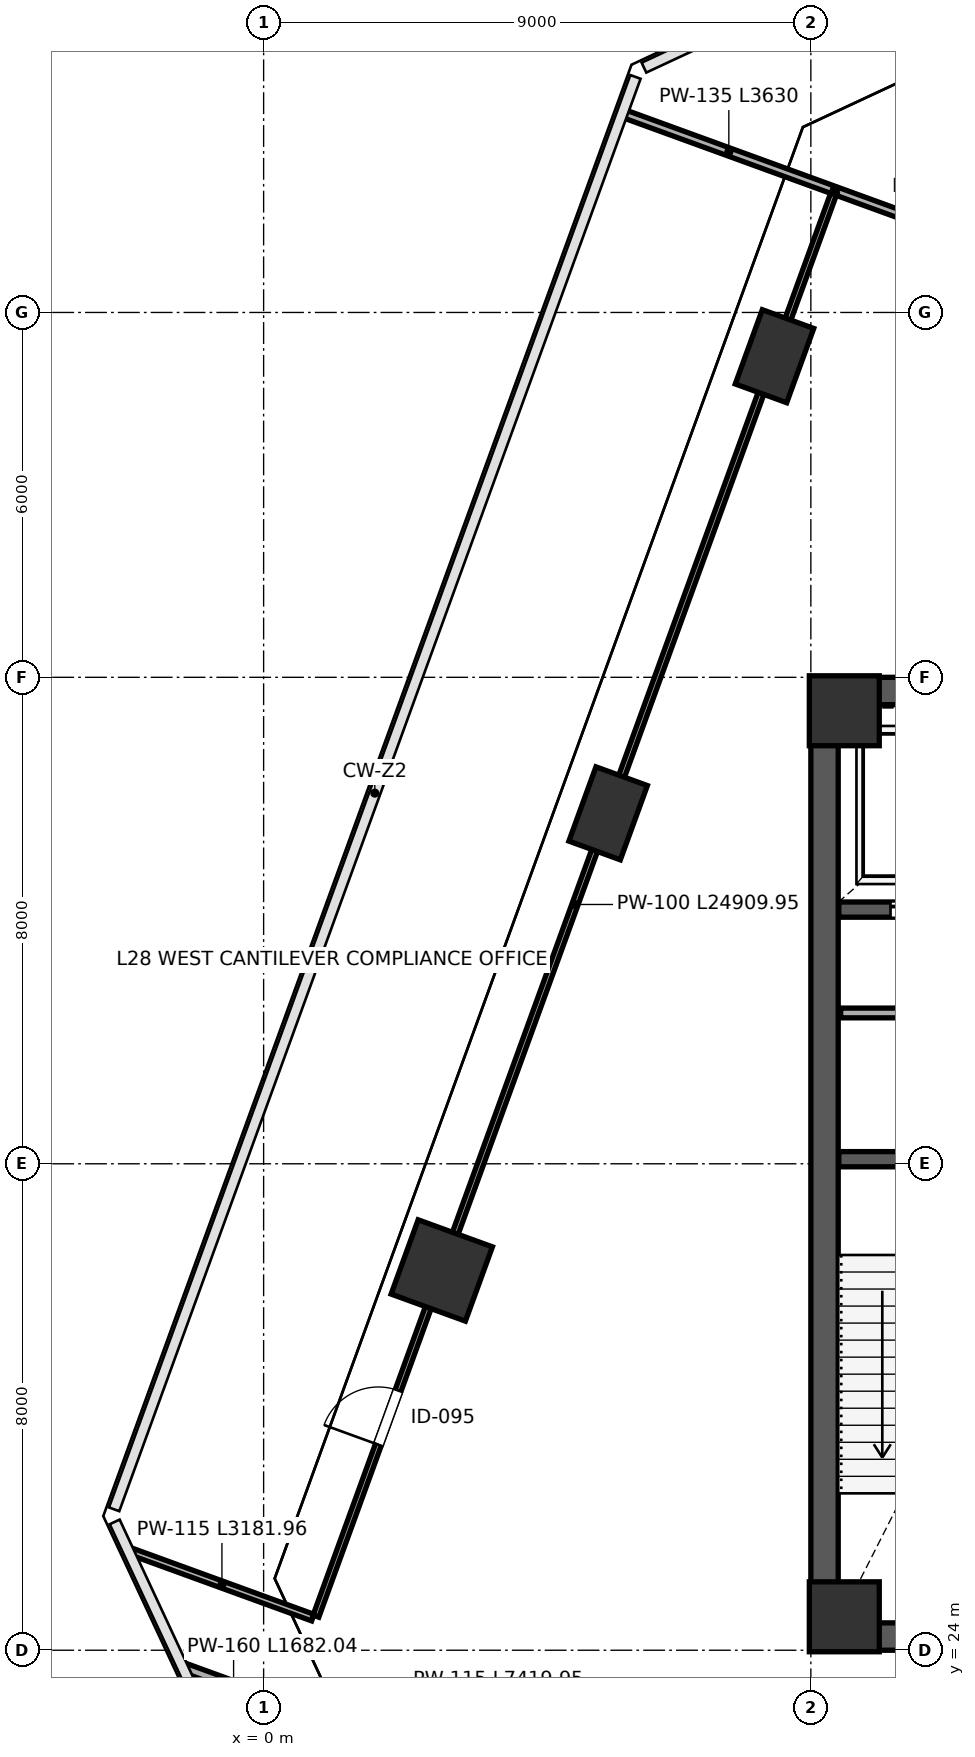
"""IFC4 building model, lengths in metres.
Left out: names, types, materials, properties, quantities, classifications, styles, units other than length and angle.
Written with IfcOpenShell. Run it as: python <this file> out.ifc"""

import sys

from ifc_helpers import new_model, si_unit, direction, frame, frame_2d, origin, origin_2d, place, context, subcontext, project, spatial, rectangle, extrude, source, transform, mapped, element, fill, save


model = new_model("IFC4")
c1 = context("Model", 3, precision=1e-05, world=origin(), true_north=direction((0.0, 1.0)))
c2 = subcontext(c1, "Body", "Model", "MODEL_VIEW")
j1 = project(units=[si_unit("LENGTHUNIT", "METRE"), si_unit("PLANEANGLEUNIT", "RADIAN")], contexts=[c1])
p1 = place(None, origin())
s1 = spatial("IfcSite", under=j1, at=p1, CompositionType="ELEMENT")
p2 = place(p1, origin())
s2 = spatial("IfcBuilding", under=s1, at=p2, CompositionType="ELEMENT")
p3 = place(p2, frame((0.0, 0.0, 127.6)))
s3 = spatial("IfcBuildingStorey", under=s2, at=p3, CompositionType="ELEMENT", Elevation=127.6)
m1 = source(origin(), c2, "Body", "SweptSolid", [
    extrude(rectangle(XDim=1.15, YDim=1.15, at=origin_2d()), origin(), (0.0, 0.0, 1.0), 5.398),
])
for number, where, z_axis, x_axis in (
    (1, (9.55, 24.55, 0.001), (0.0, 0.0, 1.0), (1.0, 0.0, 0.0)),
    (2, (9.55, 39.45, 0.001), (0.0, 0.0, 1.0), (1.0, 0.0, 0.0)),
):
    element("IfcColumn", number, at=place(p3, frame(where, z_axis=z_axis, x_axis=x_axis)), inside=s3, PredefinedType="COLUMN", context=c2, shape_type="MappedRepresentation", body=[
        mapped(m1, transform((0.0, 0.0, 0.0), scale=1.0)),
    ])
m2 = source(origin(), c2, "Body", "SweptSolid", [
    extrude(rectangle(XDim=1.3, YDim=1.3, at=origin_2d()), origin(), (0.0, 0.0, 1.0), 5.398),
])
p4 = place(p3, frame((2.93, 30.246, 0.001), z_axis=(0.0, 0.0, 1.0), x_axis=(-0.939692620786, 0.342020143326, 0.0)))
e3 = element("IfcColumn", 3, at=p4, inside=s3, PredefinedType="COLUMN", context=c2, shape_type="MappedRepresentation", body=[
    mapped(m2, transform((0.0, 0.0, 0.0), scale=1.0)),
])
m3 = source(origin(), c2, "Body", "SweptSolid", [
    extrude(rectangle(XDim=0.9, YDim=1.3, at=origin_2d()), origin(), (0.0, 0.0, 1.0), 5.398),
])
for number, where, z_axis, x_axis in (
    (4, (5.666, 37.763, 0.001), (0.0, 0.0, 1.0), (-0.94, 0.342, 0.0)),
    (5, (8.402, 45.281, 0.001), (0.0, 0.0, 1.0), (-0.94, 0.342, 0.0)),
):
    element("IfcColumn", number, at=place(p3, frame(where, z_axis=z_axis, x_axis=x_axis)), inside=s3, PredefinedType="PILASTER", context=c2, shape_type="MappedRepresentation", body=[
        mapped(m3, transform((0.0, 0.0, 0.0), scale=1.0)),
    ])
p5 = place(p3, frame((9.225, 24.45, 0.0), z_axis=(0.0, 0.0, 1.0), x_axis=(0.0, 1.0, 0.0)))
e6 = element("IfcWall", 6, at=p5, inside=s3, PredefinedType="SHEAR", context=c2, shape_type="SweptSolid", body=[
    extrude(rectangle(XDim=15.1, YDim=0.45, at=frame_2d((7.55, 0.0))), origin(), (0.0, 0.0, 1.0), 5.16),
])
for number, where, z_axis, x_axis in (
    (7, (9.0, 24.225, 0.0), (0.0, 0.0, 1.0), (1.0, 0.0, 0.0)),
    (8, (9.0, 39.775, 0.0), (0.0, 0.0, 1.0), (1.0, 0.0, 0.0)),
):
    element("IfcWall", number, at=place(p3, frame(where, z_axis=z_axis, x_axis=x_axis)), inside=s3, PredefinedType="SHEAR", context=c2, shape_type="SweptSolid", body=[
        extrude(rectangle(XDim=18.0, YDim=0.45, at=frame_2d((9.0, 0.0))), origin(), (0.0, 0.0, 1.0), 5.16),
    ])
p6 = place(p3, frame((9.46, 32.075, 0.0), z_axis=(0.0, 0.0, 1.0), x_axis=(1.0, 0.0, 0.0)))
e9 = element("IfcWall", 9, at=p6, inside=s3, PredefinedType="SHEAR", context=c2, shape_type="SweptSolid", body=[
    extrude(rectangle(XDim=3.29, YDim=0.25, at=frame_2d((1.645, 0.0))), origin(), (0.0, 0.0, 1.0), 5.16),
])
p7 = place(p3, frame((9.46, 36.18, 0.0), z_axis=(0.0, 0.0, 1.0), x_axis=(1.0, 0.0, 0.0)))
e10 = element("IfcWall", 10, at=p7, inside=s3, PredefinedType="SHEAR", context=c2, shape_type="SweptSolid", body=[
    extrude(rectangle(XDim=3.79, YDim=0.25, at=frame_2d((1.895, 0.0))), origin(), (0.0, 0.0, 1.0), 5.16),
])
p8 = place(p7, frame((2.62, 0.0, 0.0)))
e11 = element("IfcOpeningElement", 11, at=p8, cuts=e10, PredefinedType="OPENING", context=c2, shape_type="SweptSolid", body=[
    extrude(rectangle(XDim=0.85, YDim=2.1, at=frame_2d((0.425, 1.05))), frame((0.0, 0.135, 0.0), z_axis=(0.0, -1.0, 0.0), x_axis=(1.0, 0.0, 0.0)), (0.0, 0.0, 1.0), 0.27),
])
p9 = place(p7, frame((0.85, 0.0, 0.0)))
e12 = element("IfcOpeningElement", 12, at=p9, cuts=e10, PredefinedType="OPENING", context=c2, shape_type="SweptSolid", body=[
    extrude(rectangle(XDim=1.3, YDim=2.25, at=frame_2d((0.65, 1.125))), frame((0.0, 0.135, 0.0), z_axis=(0.0, -1.0, 0.0), x_axis=(1.0, 0.0, 0.0)), (0.0, 0.0, 1.0), 0.27),
])
p10 = place(p3, frame((9.49, 34.48, 0.0), z_axis=(0.0, 0.0, 1.0), x_axis=(1.0, 0.0, 0.0)))
e13 = element("IfcWall", 13, at=p10, inside=s3, PredefinedType="PARTITIONING", context=c2, shape_type="SweptSolid", body=[
    extrude(rectangle(XDim=3.7, YDim=0.16, at=frame_2d((1.85, 0.0))), origin(), (0.0, 0.0, 1.0), 5.16),
])
p11 = place(p10, frame((1.15, 0.0, 0.0)))
e14 = element("IfcOpeningElement", 14, at=p11, cuts=e13, PredefinedType="OPENING", context=c2, shape_type="SweptSolid", body=[
    extrude(rectangle(XDim=0.9, YDim=2.15, at=frame_2d((0.45, 1.075))), frame((0.0, 0.09, 0.0), z_axis=(0.0, -1.0, 0.0), x_axis=(1.0, 0.0, 0.0)), (0.0, 0.0, 1.0), 0.18),
])
p12 = place(p3, frame((-1.284, 23.702, 0.0), z_axis=(0.0, 0.0, 1.0), x_axis=(0.939708634779, -0.341976142036, 0.0)))
e15 = element("IfcWall", 15, at=p12, inside=s3, PredefinedType="PARTITIONING", context=c2, shape_type="SweptSolid", body=[
    extrude(rectangle(XDim=1.682, YDim=0.16, at=frame_2d((0.841, 0.0))), origin(), (0.0, 0.0, 1.0), 5.16),
])
p13 = place(p3, frame((9.432, 47.992, 0.0), z_axis=(0.0, 0.0, 1.0), x_axis=(0.939693422468, -0.342017940715, 0.0)))
e16 = element("IfcWall", 16, at=p13, inside=s3, PredefinedType="PARTITIONING", context=c2, shape_type="SweptSolid", body=[
    extrude(rectangle(XDim=26.67, YDim=0.135, at=frame_2d((13.335, 0.0))), origin(), (0.0, 0.0, 1.0), 5.16),
])
p14 = place(p13, frame((1.05, 0.0, 0.0)))
e17 = element("IfcOpeningElement", 17, at=p14, cuts=e16, PredefinedType="OPENING", context=c2, shape_type="SweptSolid", body=[
    extrude(rectangle(XDim=0.95, YDim=2.15, at=frame_2d((0.475, 1.075))), frame((0.0, 0.078, 0.0), z_axis=(0.0, -1.0, 0.0), x_axis=(1.0, 0.0, 0.0)), (0.0, 0.0, 1.0), 0.155),
])
p15 = place(p3, frame((-2.181, 25.625, 0.0), z_axis=(0.0, 0.0, 1.0), x_axis=(0.939714994714, -0.341958665206, 0.0)))
e18 = element("IfcWall", 18, at=p15, inside=s3, PredefinedType="PARTITIONING", context=c2, shape_type="SweptSolid", body=[
    extrude(rectangle(XDim=3.182, YDim=0.115, at=frame_2d((1.591, 0.0))), origin(), (0.0, 0.0, 1.0), 5.16),
])
p16 = place(p3, frame((0.861, 24.56, 0.0), z_axis=(0.0, 0.0, 1.0), x_axis=(0.342022409736, 0.939691795877, 0.0)))
e19 = element("IfcWall", 19, at=p16, inside=s3, PredefinedType="PARTITIONING", context=c2, shape_type="SweptSolid", body=[
    extrude(rectangle(XDim=24.91, YDim=0.1, at=frame_2d((12.455, 0.0))), origin(), (0.0, 0.0, 1.0), 4.395),
])
p17 = place(p16, frame((3.0, 0.0, 0.0)))
e20 = element("IfcOpeningElement", 20, at=p17, cuts=e19, PredefinedType="OPENING", context=c2, shape_type="SweptSolid", body=[
    extrude(rectangle(XDim=0.95, YDim=2.15, at=frame_2d((0.475, 1.075))), frame((0.0, 0.06, 0.0), z_axis=(0.0, -1.0, 0.0), x_axis=(1.0, 0.0, 0.0)), (0.0, 0.0, 1.0), 0.12),
])
p18 = place(p3, frame((5.946, 49.261, 0.0), z_axis=(0.0, 0.0, 1.0), x_axis=(0.939679480515, -0.342056243766, 0.0)))
e21 = element("IfcWall", 21, at=p18, inside=s3, PredefinedType="PARTITIONING", context=c2, shape_type="SweptSolid", body=[
    extrude(rectangle(XDim=3.63, YDim=0.135, at=frame_2d((1.815, 0.0))), origin(), (0.0, 0.0, 1.0), 5.16),
])
m4 = source(origin(), c2, "Body", "SweptSolid", [
    extrude(rectangle(XDim=1.3, YDim=2.25, at=frame_2d((0.65, 1.125))), frame((0.0, 0.025, 0.0), z_axis=(0.0, -1.0, 0.0), x_axis=(1.0, 0.0, 0.0)), (0.0, 0.0, 1.0), 0.05),
])
p19 = place(p9, origin())
e22 = element("IfcDoor", 22, at=p19, inside=s3, OperationType="SLIDING_TO_LEFT", PredefinedType="DOOR", context=c2, shape_type="MappedRepresentation", body=[
    mapped(m4, transform((0.0, 0.0, 0.0), scale=1.0)),
])
fill(e12, e22)
m5 = source(origin(), c2, "Body", "SweptSolid", [
    extrude(rectangle(XDim=0.95, YDim=2.15, at=frame_2d((0.475, 1.075))), frame((0.0, 0.025, 0.0), z_axis=(0.0, -1.0, 0.0), x_axis=(1.0, 0.0, 0.0)), (0.0, 0.0, 1.0), 0.05),
])
p20 = place(p17, origin())
e23 = element("IfcDoor", 23, at=p20, inside=s3, OperationType="SINGLE_SWING_LEFT", PredefinedType="DOOR", context=c2, shape_type="MappedRepresentation", body=[
    mapped(m5, transform((0.0, 0.0, 0.0), scale=1.0)),
])
fill(e20, e23)
save(model, sys.argv[1])
